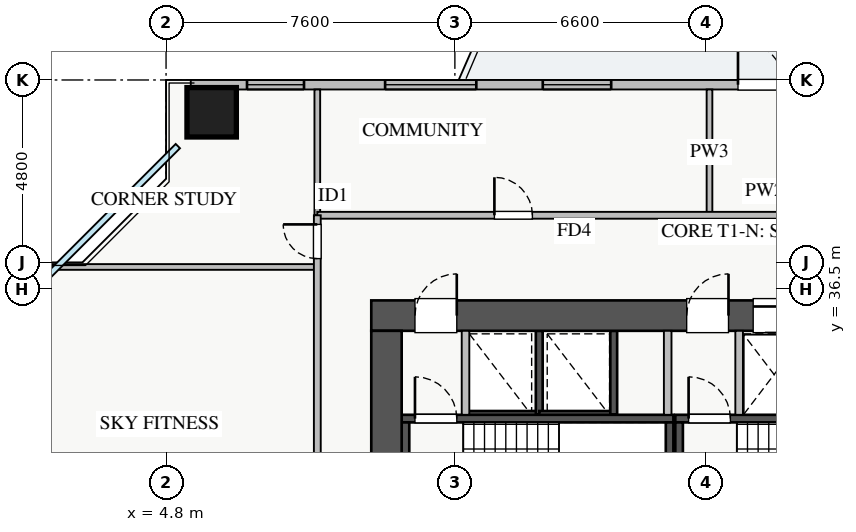
"""IFC4 building model, lengths in metres.
Left out: names, types, materials, properties, quantities, classifications, styles, units other than length and angle.
Written with IfcOpenShell. Run it as: python <this file> out.ifc"""

import sys

from ifc_helpers import new_model, si_unit, direction, frame, frame_2d, origin, origin_2d, place, context, subcontext, project, spatial, rectangle, extrude, source, transform, mapped, element, fill, save


model = new_model("IFC4")
c1 = context("Model", 3, precision=1e-05, world=origin(), true_north=direction((0.0, 1.0)))
c2 = subcontext(c1, "Body", "Model", "MODEL_VIEW")
j1 = project(units=[si_unit("LENGTHUNIT", "METRE"), si_unit("PLANEANGLEUNIT", "RADIAN")], contexts=[c1])
p1 = place(None, origin())
s1 = spatial("IfcSite", under=j1, at=p1, CompositionType="ELEMENT")
p2 = place(p1, origin())
s2 = spatial("IfcBuilding", under=s1, at=p2, CompositionType="ELEMENT")
p3 = place(p2, frame((0.0, 0.0, 26.25)))
s3 = spatial("IfcBuildingStorey", under=s2, at=p3, CompositionType="ELEMENT", Elevation=26.25)
p4 = place(p3, frame((12.68, 33.2, 0.0), z_axis=(0.0, 0.0, 1.0), x_axis=(1.0, 0.0, 0.0)))
e1 = element("IfcWall", 1, at=p4, inside=s3, PredefinedType="SHEAR", context=c2, shape_type="SweptSolid", body=[
    extrude(rectangle(XDim=1.94, YDim=0.18, at=frame_2d((0.97, 0.0))), origin(), (0.0, 0.0, 1.0), 3.07),
])
p5 = place(p3, frame((14.62, 33.2, 0.0), z_axis=(0.0, 0.0, 1.0), x_axis=(0.0, 1.0, 0.0)))
e2 = element("IfcWall", 2, at=p5, inside=s3, PredefinedType="SHEAR", context=c2, shape_type="SweptSolid", body=[
    extrude(rectangle(XDim=2.2, YDim=0.18, at=frame_2d((1.1, 0.0))), origin(), (0.0, 0.0, 1.0), 3.07),
])
p6 = place(p3, frame((14.62, 33.2, 0.0), z_axis=(0.0, 0.0, 1.0), x_axis=(1.0, 0.0, 0.0)))
e3 = element("IfcWall", 3, at=p6, inside=s3, PredefinedType="SHEAR", context=c2, shape_type="SweptSolid", body=[
    extrude(rectangle(XDim=1.96, YDim=0.18, at=frame_2d((0.98, 0.0))), origin(), (0.0, 0.0, 1.0), 3.07),
])
p7 = place(p3, frame((16.58, 33.2, 0.0), z_axis=(0.0, 0.0, 1.0), x_axis=(0.0, 1.0, 0.0)))
e4 = element("IfcWall", 4, at=p7, inside=s3, PredefinedType="SHEAR", context=c2, shape_type="SweptSolid", body=[
    extrude(rectangle(XDim=2.2, YDim=0.18, at=frame_2d((1.1, 0.0))), origin(), (0.0, 0.0, 1.0), 3.07),
])
p8 = place(p3, frame((19.88, 33.2, 0.0), z_axis=(0.0, 0.0, 1.0), x_axis=(1.0, 0.0, 0.0)))
e5 = element("IfcWall", 5, at=p8, inside=s3, PredefinedType="SHEAR", context=c2, shape_type="SweptSolid", body=[
    extrude(rectangle(XDim=1.87, YDim=0.18, at=frame_2d((0.935, 0.0))), origin(), (0.0, 0.0, 1.0), 3.07),
])
p9 = place(p3, frame((11.0, 33.09, 0.0), z_axis=(0.0, 0.0, 1.0), x_axis=(1.0, 0.0, 0.0)))
e6 = element("IfcWall", 6, at=p9, inside=s3, PredefinedType="SHEAR", context=c2, shape_type="SweptSolid", body=[
    extrude(rectangle(XDim=7.15, YDim=0.2, at=frame_2d((3.575, 0.0))), origin(), (0.0, 0.0, 1.0), 3.25),
])
p10 = place(p9, frame((0.35, 0.0, 0.0)))
e7 = element("IfcOpeningElement", 7, at=p10, cuts=e6, PredefinedType="OPENING", context=c2, shape_type="SweptSolid", body=[
    extrude(rectangle(XDim=1.1, YDim=2.05, at=frame_2d((0.55, 1.025))), frame((0.0, 0.11, 0.0), z_axis=(0.0, -1.0, 0.0), x_axis=(1.0, 0.0, 0.0)), (0.0, 0.0, 1.0), 0.22),
])
for number, where, z_axis, x_axis in (
    (8, (11.1, 30.05, 0.0), (0.0, 0.0, 1.0), (0.0, 1.0, 0.0)),
    (9, (18.05, 30.05, 0.0), (0.0, 0.0, 1.0), (0.0, 1.0, 0.0)),
):
    element("IfcWall", number, at=place(p3, frame(where, z_axis=z_axis, x_axis=x_axis)), inside=s3, PredefinedType="SHEAR", context=c2, shape_type="SweptSolid", body=[
        extrude(rectangle(XDim=2.94, YDim=0.2, at=frame_2d((1.47, 0.0))), origin(), (0.0, 0.0, 1.0), 3.25),
    ])
p11 = place(p3, frame((18.2, 33.09, 0.0), z_axis=(0.0, 0.0, 1.0), x_axis=(1.0, 0.0, 0.0)))
e10 = element("IfcWall", 10, at=p11, inside=s3, PredefinedType="SHEAR", context=c2, shape_type="SweptSolid", body=[
    extrude(rectangle(XDim=7.15, YDim=0.2, at=frame_2d((3.575, 0.0))), origin(), (0.0, 0.0, 1.0), 3.25),
])
p12 = place(p11, frame((0.35, 0.0, 0.0)))
e11 = element("IfcOpeningElement", 11, at=p12, cuts=e10, PredefinedType="OPENING", context=c2, shape_type="SweptSolid", body=[
    extrude(rectangle(XDim=1.1, YDim=2.05, at=frame_2d((0.55, 1.025))), frame((0.0, 0.11, 0.0), z_axis=(0.0, -1.0, 0.0), x_axis=(1.0, 0.0, 0.0)), (0.0, 0.0, 1.0), 0.22),
])
p13 = place(p3, frame((18.3, 30.05, 0.0), z_axis=(0.0, 0.0, 1.0), x_axis=(0.0, 1.0, 0.0)))
e12 = element("IfcWall", 12, at=p13, inside=s3, PredefinedType="SHEAR", context=c2, shape_type="SweptSolid", body=[
    extrude(rectangle(XDim=2.94, YDim=0.2, at=frame_2d((1.47, 0.0))), origin(), (0.0, 0.0, 1.0), 3.25),
])
p14 = place(p3, frame((10.2, 35.8, 0.0), z_axis=(0.0, 0.0, 1.0), x_axis=(1.0, 0.0, 0.0)))
e13 = element("IfcWall", 13, at=p14, inside=s3, PredefinedType="SHEAR", context=c2, shape_type="SweptSolid", body=[
    extrude(rectangle(XDim=17.6, YDim=0.8, at=frame_2d((8.8, 0.0))), origin(), (0.0, 0.0, 1.0), 3.25),
])
p15 = place(p14, frame((1.15, 0.0, 0.0)))
e14 = element("IfcOpeningElement", 14, at=p15, cuts=e13, PredefinedType="OPENING", context=c2, shape_type="SweptSolid", body=[
    extrude(rectangle(XDim=1.1, YDim=2.05, at=frame_2d((0.55, 1.025))), frame((0.0, 0.41, 0.0), z_axis=(0.0, -1.0, 0.0), x_axis=(1.0, 0.0, 0.0)), (0.0, 0.0, 1.0), 0.82),
])
p16 = place(p14, frame((8.3, 0.0, 0.0)))
e15 = element("IfcOpeningElement", 15, at=p16, cuts=e13, PredefinedType="OPENING", context=c2, shape_type="SweptSolid", body=[
    extrude(rectangle(XDim=1.1, YDim=2.05, at=frame_2d((0.55, 1.025))), frame((0.0, 0.41, 0.0), z_axis=(0.0, -1.0, 0.0), x_axis=(1.0, 0.0, 0.0)), (0.0, 0.0, 1.0), 0.82),
])
p17 = place(p14, frame((10.05, 0.0, 0.0)))
e16 = element("IfcOpeningElement", 16, at=p17, cuts=e13, PredefinedType="OPENING", context=c2, shape_type="SweptSolid", body=[
    extrude(rectangle(XDim=1.1, YDim=2.05, at=frame_2d((0.55, 1.025))), frame((0.0, 0.41, 0.0), z_axis=(0.0, -1.0, 0.0), x_axis=(1.0, 0.0, 0.0)), (0.0, 0.0, 1.0), 0.82),
])
p18 = place(p14, frame((14.74, 0.0, 0.0)))
e17 = element("IfcOpeningElement", 17, at=p18, cuts=e13, PredefinedType="OPENING", context=c2, shape_type="SweptSolid", body=[
    extrude(rectangle(XDim=1.0, YDim=2.05, at=frame_2d((0.5, 1.025))), frame((0.0, 0.41, 0.0), z_axis=(0.0, -1.0, 0.0), x_axis=(1.0, 0.0, 0.0)), (0.0, 0.0, 1.0), 0.82),
])
p19 = place(p14, frame((12.585, 0.0, 0.0)))
e18 = element("IfcOpeningElement", 18, at=p19, cuts=e13, PredefinedType="OPENING", context=c2, shape_type="SweptSolid", body=[
    extrude(rectangle(XDim=1.0, YDim=2.05, at=frame_2d((0.5, 1.025))), frame((0.0, 0.41, 0.0), z_axis=(0.0, -1.0, 0.0), x_axis=(1.0, 0.0, 0.0)), (0.0, 0.0, 1.0), 0.82),
])
p20 = place(p3, frame((10.6, 29.8, 0.0), z_axis=(0.0, 0.0, 1.0), x_axis=(0.0, 1.0, 0.0)))
e19 = element("IfcWall", 19, at=p20, inside=s3, PredefinedType="SHEAR", context=c2, shape_type="SweptSolid", body=[
    extrude(rectangle(XDim=5.6, YDim=0.8, at=frame_2d((2.8, 0.0))), origin(), (0.0, 0.0, 1.0), 3.25),
])
m1 = source(origin(), c2, "Body", "SweptSolid", [
    extrude(rectangle(XDim=1.3, YDim=1.3, at=origin_2d()), origin(), (0.0, 0.0, 1.0), 3.25),
])
p21 = place(p3, frame((6.0, 41.15, 0.0), z_axis=(0.0, 0.0, 1.0), x_axis=(1.0, 0.0, 0.0)))
e20 = element("IfcColumn", 20, at=p21, inside=s3, PredefinedType="COLUMN", context=c2, shape_type="MappedRepresentation", body=[
    mapped(m1, transform((0.0, 0.0, 0.0), x_axis=(1.0, 0.0, 0.0), y_axis=(0.0, 1.0, 0.0), z_axis=(0.0, 0.0, 1.0), scale=1.0)),
])
p22 = place(p3, frame((5.45, 41.875, 0.0), z_axis=(0.0, 0.0, 1.0), x_axis=(1.0, 0.0, 0.0)))
e21 = element("IfcWall", 21, at=p22, inside=s3, PredefinedType="STANDARD", context=c2, shape_type="SweptSolid", body=[
    extrude(rectangle(XDim=27.1, YDim=0.25, at=frame_2d((13.55, 0.0))), origin(), (0.0, 0.0, 1.0), 2.61),
])
p23 = place(p22, frame((14.4, 0.0, 0.0)))
e22 = element("IfcOpeningElement", 22, at=p23, cuts=e21, PredefinedType="OPENING", context=c2, shape_type="SweptSolid", body=[
    extrude(rectangle(XDim=1.2, YDim=2.1, at=frame_2d((0.6, 1.05))), frame((0.0, 0.135, 0.0), z_axis=(0.0, -1.0, 0.0), x_axis=(1.0, 0.0, 0.0)), (0.0, 0.0, 1.0), 0.27),
])
p24 = place(p22, frame((1.48, 0.0, 0.9)))
e23 = element("IfcOpeningElement", 23, at=p24, cuts=e21, PredefinedType="OPENING", context=c2, shape_type="SweptSolid", body=[
    extrude(rectangle(XDim=1.5, YDim=1.5, at=frame_2d((0.75, 0.75))), frame((0.0, 0.135, 0.0), z_axis=(0.0, -1.0, 0.0), x_axis=(1.0, 0.0, 0.0)), (0.0, 0.0, 1.0), 0.27),
])
p25 = place(p22, frame((9.263, 0.0, 0.9)))
e24 = element("IfcOpeningElement", 24, at=p25, cuts=e21, PredefinedType="OPENING", context=c2, shape_type="SweptSolid", body=[
    extrude(rectangle(XDim=1.8, YDim=1.45, at=frame_2d((0.9, 0.725))), frame((0.0, 0.135, 0.0), z_axis=(0.0, -1.0, 0.0), x_axis=(1.0, 0.0, 0.0)), (0.0, 0.0, 1.0), 0.27),
])
p26 = place(p22, frame((16.188, 0.0, 0.9)))
e25 = element("IfcOpeningElement", 25, at=p26, cuts=e21, PredefinedType="OPENING", context=c2, shape_type="SweptSolid", body=[
    extrude(rectangle(XDim=1.5, YDim=1.45, at=frame_2d((0.75, 0.725))), frame((0.0, 0.135, 0.0), z_axis=(0.0, -1.0, 0.0), x_axis=(1.0, 0.0, 0.0)), (0.0, 0.0, 1.0), 0.27),
])
p27 = place(p22, frame((22.663, 0.0, 0.9)))
e26 = element("IfcOpeningElement", 26, at=p27, cuts=e21, PredefinedType="OPENING", context=c2, shape_type="SweptSolid", body=[
    extrude(rectangle(XDim=2.1, YDim=1.48, at=frame_2d((1.05, 0.74))), frame((0.0, 0.135, 0.0), z_axis=(0.0, -1.0, 0.0), x_axis=(1.0, 0.0, 0.0)), (0.0, 0.0, 1.0), 0.27),
])
p28 = place(p22, frame((5.114, 0.0, 0.9)))
e27 = element("IfcOpeningElement", 27, at=p28, cuts=e21, PredefinedType="OPENING", context=c2, shape_type="SweptSolid", body=[
    extrude(rectangle(XDim=2.4, YDim=1.5, at=frame_2d((1.2, 0.75))), frame((0.0, 0.135, 0.0), z_axis=(0.0, -1.0, 0.0), x_axis=(1.0, 0.0, 0.0)), (0.0, 0.0, 1.0), 0.27),
])
for number, where, z_axis, x_axis in (
    (28, (12.68, 33.19, 0.0), (0.0, 0.0, 1.0), (0.0, 1.0, 0.0)),
    (29, (18.0, 33.19, 0.0), (0.0, 0.0, 1.0), (0.0, 1.0, 0.0)),
    (30, (19.88, 33.19, 0.0), (0.0, 0.0, 1.0), (0.0, 1.0, 0.0)),
):
    element("IfcWall", number, at=place(p3, frame(where, z_axis=z_axis, x_axis=x_axis)), inside=s3, PredefinedType="PARTITIONING", context=c2, shape_type="SweptSolid", body=[
        extrude(rectangle(XDim=2.21, YDim=0.2, at=frame_2d((1.105, 0.0))), origin(), (0.0, 0.0, 1.0), 3.07),
    ])
p29 = place(p3, frame((19.1, 38.44, 0.0), z_axis=(0.0, 0.0, 1.0), x_axis=(0.0, 1.0, 0.0)))
e31 = element("IfcWall", 31, at=p29, inside=s3, PredefinedType="PARTITIONING", context=c2, shape_type="SweptSolid", body=[
    extrude(rectangle(XDim=3.31, YDim=0.15, at=frame_2d((1.655, 0.0))), origin(), (0.0, 0.0, 1.0), 2.715),
])
p30 = place(p3, frame((8.78, 38.44, 0.0), z_axis=(0.0, 0.0, 1.0), x_axis=(0.0, 1.0, 0.0)))
e32 = element("IfcWall", 32, at=p30, inside=s3, PredefinedType="PARTITIONING", context=c2, shape_type="SweptSolid", body=[
    extrude(rectangle(XDim=3.31, YDim=0.15, at=frame_2d((1.655, 0.0))), origin(), (0.0, 0.0, 1.0), 3.07),
])
p31 = place(p3, frame((8.78, 38.44, 0.0), z_axis=(0.0, 0.0, 1.0), x_axis=(1.0, 0.0, 0.0)))
e33 = element("IfcWall", 33, at=p31, inside=s3, PredefinedType="PARTITIONING", context=c2, shape_type="SweptSolid", body=[
    extrude(rectangle(XDim=23.54, YDim=0.18, at=frame_2d((11.77, 0.0))), origin(), (0.0, 0.0, 1.0), 3.07),
])
p32 = place(p31, frame((4.66, 0.0, 0.0)))
e34 = element("IfcOpeningElement", 34, at=p32, cuts=e33, PredefinedType="OPENING", context=c2, shape_type="SweptSolid", body=[
    extrude(rectangle(XDim=1.0, YDim=2.05, at=frame_2d((0.5, 1.025))), frame((0.0, 0.1, 0.0), z_axis=(0.0, -1.0, 0.0), x_axis=(1.0, 0.0, 0.0)), (0.0, 0.0, 1.0), 0.2),
])
p33 = place(p31, frame((16.43, 0.0, 0.0)))
e35 = element("IfcOpeningElement", 35, at=p33, cuts=e33, PredefinedType="OPENING", context=c2, shape_type="SweptSolid", body=[
    extrude(rectangle(XDim=1.0, YDim=2.05, at=frame_2d((0.5, 1.025))), frame((0.0, 0.1, 0.0), z_axis=(0.0, -1.0, 0.0), x_axis=(1.0, 0.0, 0.0)), (0.0, 0.0, 1.0), 0.2),
])
p34 = place(p3, frame((0.25, 37.08, 0.0), z_axis=(0.0, 0.0, 1.0), x_axis=(1.0, 0.0, 0.0)))
e36 = element("IfcWall", 36, at=p34, inside=s3, PredefinedType="PARTITIONING", context=c2, shape_type="SweptSolid", body=[
    extrude(rectangle(XDim=8.53, YDim=0.15, at=frame_2d((4.265, 0.0))), origin(), (0.0, 0.0, 1.0), 3.07),
])
p35 = place(p3, frame((8.78, 7.21, 0.0), z_axis=(0.0, 0.0, 1.0), x_axis=(0.0, 1.0, 0.0)))
e37 = element("IfcWall", 37, at=p35, inside=s3, PredefinedType="PARTITIONING", context=c2, shape_type="SweptSolid", body=[
    extrude(rectangle(XDim=31.23, YDim=0.18, at=frame_2d((15.615, 0.0))), origin(), (0.0, 0.0, 1.0), 3.07),
])
p36 = place(p35, frame((30.09, 0.0, 0.0)))
e38 = element("IfcOpeningElement", 38, at=p36, cuts=e37, PredefinedType="OPENING", context=c2, shape_type="SweptSolid", body=[
    extrude(rectangle(XDim=0.9, YDim=2.05, at=frame_2d((0.45, 1.025))), frame((0.0, 0.1, 0.0), z_axis=(0.0, -1.0, 0.0), x_axis=(1.0, 0.0, 0.0)), (0.0, 0.0, 1.0), 0.2),
])
p37 = place(p35, frame((0.24, 0.0, 0.0)))
e39 = element("IfcOpeningElement", 39, at=p37, cuts=e37, PredefinedType="OPENING", context=c2, shape_type="SweptSolid", body=[
    extrude(rectangle(XDim=0.9, YDim=2.05, at=frame_2d((0.45, 1.025))), frame((0.0, 0.1, 0.0), z_axis=(0.0, -1.0, 0.0), x_axis=(1.0, 0.0, 0.0)), (0.0, 0.0, 1.0), 0.2),
])
p38 = place(p35, frame((3.975, 0.0, 0.0)))
e40 = element("IfcOpeningElement", 40, at=p38, cuts=e37, PredefinedType="OPENING", context=c2, shape_type="SweptSolid", body=[
    extrude(rectangle(XDim=1.0, YDim=2.05, at=frame_2d((0.5, 1.025))), frame((0.0, 0.1, 0.0), z_axis=(0.0, -1.0, 0.0), x_axis=(1.0, 0.0, 0.0)), (0.0, 0.0, 1.0), 0.2),
])
p39 = place(p35, frame((22.0, 0.0, 0.0)))
e41 = element("IfcOpeningElement", 41, at=p39, cuts=e37, PredefinedType="OPENING", context=c2, shape_type="SweptSolid", body=[
    extrude(rectangle(XDim=1.0, YDim=2.05, at=frame_2d((0.5, 1.025))), frame((0.0, 0.1, 0.0), z_axis=(0.0, -1.0, 0.0), x_axis=(1.0, 0.0, 0.0)), (0.0, 0.0, 1.0), 0.2),
])
m2 = source(origin(), c2, "Body", "SweptSolid", [
    extrude(rectangle(XDim=1.2, YDim=2.1, at=frame_2d((0.6, 1.05))), frame((0.0, 0.025, 0.0), z_axis=(0.0, -1.0, 0.0), x_axis=(1.0, 0.0, 0.0)), (0.0, 0.0, 1.0), 0.05),
])
p40 = place(p23, origin())
e42 = element("IfcDoor", 42, at=p40, inside=s3, OperationType="SINGLE_SWING_LEFT", PredefinedType="DOOR", context=c2, shape_type="MappedRepresentation", body=[
    mapped(m2, transform((0.0, 0.0, 0.0), x_axis=(1.0, 0.0, 0.0), y_axis=(0.0, 1.0, 0.0), z_axis=(0.0, 0.0, 1.0), scale=1.0)),
])
fill(e22, e42)
m3 = source(origin(), c2, "Body", "SweptSolid", [
    extrude(rectangle(XDim=1.5, YDim=1.5, at=frame_2d((0.75, 0.75))), frame((0.0, 0.03, 0.0), z_axis=(0.0, -1.0, 0.0), x_axis=(1.0, 0.0, 0.0)), (0.0, 0.0, 1.0), 0.06),
])
p41 = place(p24, origin())
e43 = element("IfcWindow", 43, at=p41, inside=s3, PartitioningType="TRIPLE_PANEL_VERTICAL", PredefinedType="WINDOW", context=c2, shape_type="MappedRepresentation", body=[
    mapped(m3, transform((0.0, 0.0, 0.0), x_axis=(1.0, 0.0, 0.0), y_axis=(0.0, 1.0, 0.0), z_axis=(0.0, 0.0, 1.0), scale=1.0)),
])
fill(e23, e43)
m4 = source(origin(), c2, "Body", "SweptSolid", [
    extrude(rectangle(XDim=1.8, YDim=1.45, at=frame_2d((0.9, 0.725))), frame((0.0, 0.03, 0.0), z_axis=(0.0, -1.0, 0.0), x_axis=(1.0, 0.0, 0.0)), (0.0, 0.0, 1.0), 0.06),
])
p42 = place(p25, origin())
e44 = element("IfcWindow", 44, at=p42, inside=s3, PartitioningType="DOUBLE_PANEL_VERTICAL", PredefinedType="WINDOW", context=c2, shape_type="MappedRepresentation", body=[
    mapped(m4, transform((0.0, 0.0, 0.0), x_axis=(1.0, 0.0, 0.0), y_axis=(0.0, 1.0, 0.0), z_axis=(0.0, 0.0, 1.0), scale=1.0)),
])
fill(e24, e44)
m5 = source(origin(), c2, "Body", "SweptSolid", [
    extrude(rectangle(XDim=1.1, YDim=2.05, at=frame_2d((0.55, 1.025))), frame((0.0, 0.025, 0.0), z_axis=(0.0, -1.0, 0.0), x_axis=(1.0, 0.0, 0.0)), (0.0, 0.0, 1.0), 0.05),
])
p43 = place(p15, origin())
e45 = element("IfcDoor", 45, at=p43, inside=s3, OperationType="SINGLE_SWING_RIGHT", PredefinedType="DOOR", context=c2, shape_type="MappedRepresentation", body=[
    mapped(m5, transform((0.0, 0.0, 0.0), x_axis=(1.0, 0.0, 0.0), y_axis=(0.0, 1.0, 0.0), z_axis=(0.0, 0.0, 1.0), scale=1.0)),
])
fill(e14, e45)
p44 = place(p10, origin())
e46 = element("IfcDoor", 46, at=p44, inside=s3, OperationType="SINGLE_SWING_LEFT", PredefinedType="DOOR", context=c2, shape_type="MappedRepresentation", body=[
    mapped(m5, transform((0.0, 0.0, 0.0), x_axis=(1.0, 0.0, 0.0), y_axis=(0.0, 1.0, 0.0), z_axis=(0.0, 0.0, 1.0), scale=1.0)),
])
fill(e7, e46)
p45 = place(p16, origin())
e47 = element("IfcDoor", 47, at=p45, inside=s3, OperationType="SINGLE_SWING_RIGHT", PredefinedType="DOOR", context=c2, shape_type="MappedRepresentation", body=[
    mapped(m5, transform((0.0, 0.0, 0.0), x_axis=(1.0, 0.0, 0.0), y_axis=(0.0, 1.0, 0.0), z_axis=(0.0, 0.0, 1.0), scale=1.0)),
])
fill(e15, e47)
p46 = place(p12, origin())
e48 = element("IfcDoor", 48, at=p46, inside=s3, OperationType="SINGLE_SWING_LEFT", PredefinedType="DOOR", context=c2, shape_type="MappedRepresentation", body=[
    mapped(m5, transform((0.0, 0.0, 0.0), x_axis=(1.0, 0.0, 0.0), y_axis=(0.0, 1.0, 0.0), z_axis=(0.0, 0.0, 1.0), scale=1.0)),
])
fill(e11, e48)
p47 = place(p17, origin())
e49 = element("IfcDoor", 49, at=p47, inside=s3, OperationType="SLIDING_TO_LEFT", PredefinedType="DOOR", context=c2, shape_type="MappedRepresentation", body=[
    mapped(m5, transform((0.0, 0.0, 0.0), x_axis=(1.0, 0.0, 0.0), y_axis=(0.0, 1.0, 0.0), z_axis=(0.0, 0.0, 1.0), scale=1.0)),
])
fill(e16, e49)
m6 = source(origin(), c2, "Body", "SweptSolid", [
    extrude(rectangle(XDim=1.0, YDim=2.05, at=frame_2d((0.5, 1.025))), frame((0.0, 0.025, 0.0), z_axis=(0.0, -1.0, 0.0), x_axis=(1.0, 0.0, 0.0)), (0.0, 0.0, 1.0), 0.05),
])
p48 = place(p32, origin())
e50 = element("IfcDoor", 50, at=p48, inside=s3, OperationType="SINGLE_SWING_LEFT", PredefinedType="DOOR", context=c2, shape_type="MappedRepresentation", body=[
    mapped(m6, transform((0.0, 0.0, 0.0), x_axis=(1.0, 0.0, 0.0), y_axis=(0.0, 1.0, 0.0), z_axis=(0.0, 0.0, 1.0), scale=1.0)),
])
fill(e34, e50)
m7 = source(origin(), c2, "Body", "SweptSolid", [
    extrude(rectangle(XDim=0.9, YDim=2.05, at=frame_2d((0.45, 1.025))), frame((0.0, 0.025, 0.0), z_axis=(0.0, -1.0, 0.0), x_axis=(1.0, 0.0, 0.0)), (0.0, 0.0, 1.0), 0.05),
])
p49 = place(p36, origin())
e51 = element("IfcDoor", 51, at=p49, inside=s3, OperationType="SINGLE_SWING_RIGHT", PredefinedType="DOOR", context=c2, shape_type="MappedRepresentation", body=[
    mapped(m7, transform((0.0, 0.0, 0.0), x_axis=(1.0, 0.0, 0.0), y_axis=(0.0, 1.0, 0.0), z_axis=(0.0, 0.0, 1.0), scale=1.0)),
])
fill(e38, e51)
m8 = source(origin(), c2, "Body", "SweptSolid", [
    extrude(rectangle(XDim=2.4, YDim=1.5, at=frame_2d((1.2, 0.75))), frame((0.0, 0.03, 0.0), z_axis=(0.0, -1.0, 0.0), x_axis=(1.0, 0.0, 0.0)), (0.0, 0.0, 1.0), 0.06),
])
p50 = place(p28, origin())
e52 = element("IfcWindow", 52, at=p50, inside=s3, PartitioningType="TRIPLE_PANEL_VERTICAL", PredefinedType="WINDOW", context=c2, shape_type="MappedRepresentation", body=[
    mapped(m8, transform((0.0, 0.0, 0.0), x_axis=(1.0, 0.0, 0.0), y_axis=(0.0, 1.0, 0.0), z_axis=(0.0, 0.0, 1.0), scale=1.0)),
])
fill(e27, e52)
save(model, sys.argv[1])
